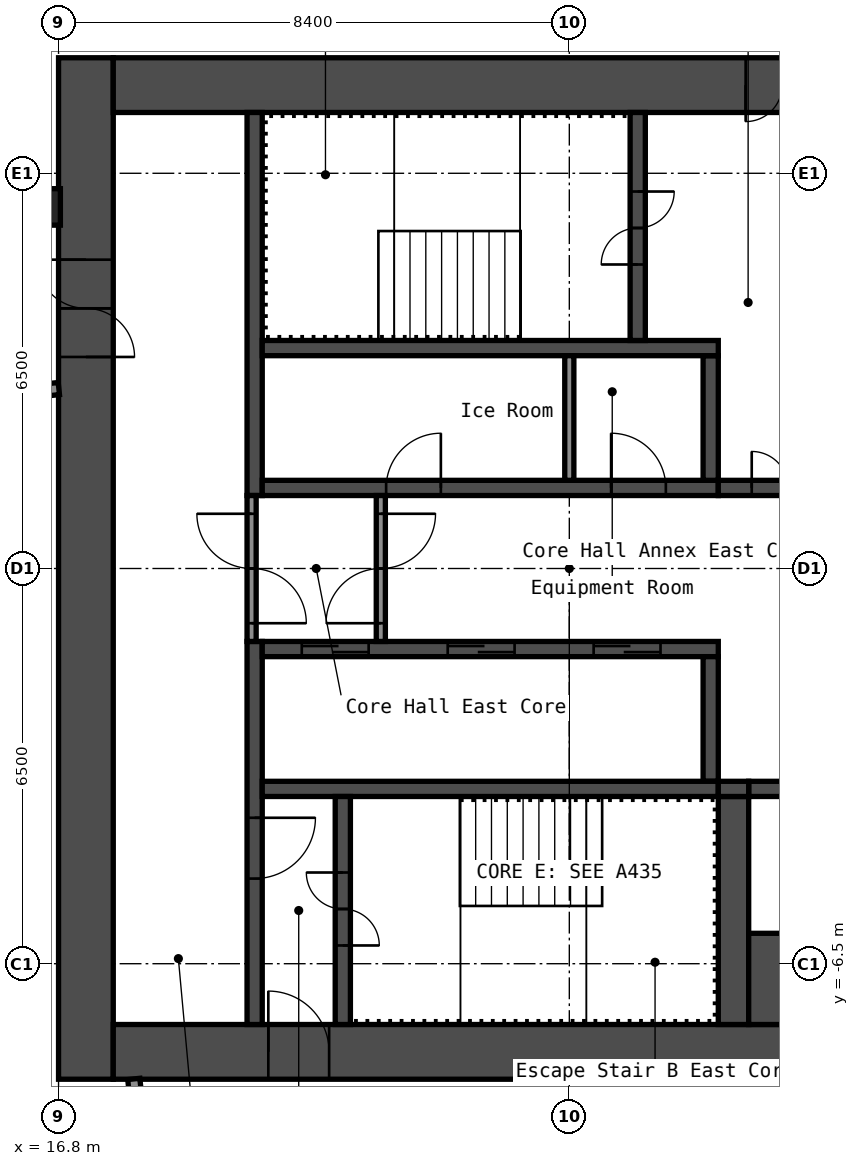
"""IFC4 building model, lengths in metres.
Left out: names, types, materials, properties, quantities, classifications, styles, units other than length and angle.
Written with IfcOpenShell. Run it as: python <this file> out.ifc"""

import sys

from ifc_helpers import new_model, si_unit, direction, frame, frame_2d, origin, origin_2d, place, context, subcontext, project, spatial, rectangle, hollow_rectangle, extrude, element, fill, save


model = new_model("IFC4")
c1 = context("Model", 3, precision=1e-05, world=origin(), true_north=direction((0.0, 1.0)))
c2 = subcontext(c1, "Body", "Model", "MODEL_VIEW")
j1 = project(units=[si_unit("LENGTHUNIT", "METRE"), si_unit("PLANEANGLEUNIT", "RADIAN")], contexts=[c1])
p1 = place(None, origin())
s1 = spatial("IfcSite", under=j1, at=p1, CompositionType="ELEMENT")
p2 = place(p1, origin())
s2 = spatial("IfcBuilding", under=s1, at=p2, CompositionType="ELEMENT")
p3 = place(p2, frame((0.0, 0.0, 239.0)))
s3 = spatial("IfcBuildingStorey", under=s2, at=p3, CompositionType="ELEMENT", Elevation=239.0)
p4 = place(p3, frame((16.53, 5.947, 0.0), z_axis=(0.0, 0.0, 1.0), x_axis=(1.0, 0.0, 0.0)))
e1 = element("IfcColumn", 1, at=p4, inside=s3, PredefinedType="COLUMN", context=c2, shape_type="SweptSolid", body=[
    extrude(hollow_rectangle(XDim=0.6, YDim=0.6, WallThickness=0.025, InnerFilletRadius=0.038, OuterFilletRadius=0.062, at=origin_2d()), origin(), (0.0, 0.0, 1.0), 2.75),
])
p5 = place(p3, frame((17.25, -8.4, 0.0), z_axis=(0.0, 0.0, 1.0), x_axis=(0.0, 1.0, 0.0)))
e2 = element("IfcWall", 2, at=p5, inside=s3, PredefinedType="SHEAR", context=c2, shape_type="SweptSolid", body=[
    extrude(rectangle(XDim=16.8, YDim=0.9, at=frame_2d((8.4, 0.0))), origin(), (0.0, 0.0, 1.0), 2.75),
])
p6 = place(p5, frame((11.879, 0.0, 0.0)))
e3 = element("IfcOpeningElement", 3, at=p6, cuts=e2, PredefinedType="OPENING", context=c2, shape_type="SweptSolid", body=[
    extrude(rectangle(XDim=1.6, YDim=2.1, at=frame_2d((0.8, 1.05))), frame((0.0, 0.46, 0.0), z_axis=(0.0, -1.0, 0.0), x_axis=(1.0, 0.0, 0.0)), (0.0, 0.0, 1.0), 0.92),
])
p7 = place(p3, frame((17.7, 7.95, 0.0), z_axis=(0.0, 0.0, 1.0), x_axis=(1.0, 0.0, 0.0)))
e4 = element("IfcWall", 4, at=p7, inside=s3, PredefinedType="SHEAR", context=c2, shape_type="SweptSolid", body=[
    extrude(rectangle(XDim=15.0, YDim=0.9, at=frame_2d((7.5, 0.0))), origin(), (0.0, 0.0, 1.0), 2.75),
])
p8 = place(p7, frame((10.4, 0.0, 0.0)))
e5 = element("IfcOpeningElement", 5, at=p8, cuts=e4, PredefinedType="OPENING", context=c2, shape_type="SweptSolid", body=[
    extrude(rectangle(XDim=1.2, YDim=2.1, at=frame_2d((0.6, 1.05))), frame((0.0, 0.46, 0.0), z_axis=(0.0, -1.0, 0.0), x_axis=(1.0, 0.0, 0.0)), (0.0, 0.0, 1.0), 0.92),
])
p9 = place(p7, frame((13.35, 0.0, 0.0)))
e6 = element("IfcOpeningElement", 6, at=p9, cuts=e4, PredefinedType="OPENING", context=c2, shape_type="SweptSolid", body=[
    extrude(rectangle(XDim=0.9, YDim=2.1, at=frame_2d((0.45, 1.05))), frame((0.0, 0.46, 0.0), z_axis=(0.0, -1.0, 0.0), x_axis=(1.0, 0.0, 0.0)), (0.0, 0.0, 1.0), 0.92),
])
p10 = place(p3, frame((17.7, -7.95, 0.0), z_axis=(0.0, 0.0, 1.0), x_axis=(1.0, 0.0, 0.0)))
e7 = element("IfcWall", 7, at=p10, inside=s3, PredefinedType="SHEAR", context=c2, shape_type="SweptSolid", body=[
    extrude(rectangle(XDim=15.0, YDim=0.9, at=frame_2d((7.5, 0.0))), origin(), (0.0, 0.0, 1.0), 2.75),
])
p11 = place(p10, frame((2.55, 0.0, 0.0)))
e8 = element("IfcOpeningElement", 8, at=p11, cuts=e7, PredefinedType="OPENING", context=c2, shape_type="SweptSolid", body=[
    extrude(rectangle(XDim=1.0, YDim=2.1, at=frame_2d((0.5, 1.05))), frame((0.0, 0.46, 0.0), z_axis=(0.0, -1.0, 0.0), x_axis=(1.0, 0.0, 0.0)), (0.0, 0.0, 1.0), 0.92),
])
p12 = place(p3, frame((20.025, 1.2, 0.0), z_axis=(0.0, 0.0, 1.0), x_axis=(0.0, 1.0, 0.0)))
e9 = element("IfcWall", 9, at=p12, inside=s3, PredefinedType="SHEAR", context=c2, shape_type="SweptSolid", body=[
    extrude(rectangle(XDim=6.3, YDim=0.25, at=frame_2d((3.15, 0.0))), origin(), (0.0, 0.0, 1.0), 2.75),
])
p13 = place(p3, frame((20.025, -7.5, 0.0), z_axis=(0.0, 0.0, 1.0), x_axis=(0.0, 1.0, 0.0)))
e10 = element("IfcWall", 10, at=p13, inside=s3, PredefinedType="SHEAR", context=c2, shape_type="SweptSolid", body=[
    extrude(rectangle(XDim=6.3, YDim=0.25, at=frame_2d((3.15, 0.0))), origin(), (0.0, 0.0, 1.0), 2.75),
])
p14 = place(p13, frame((2.4, 0.0, 0.0)))
e11 = element("IfcOpeningElement", 11, at=p14, cuts=e10, PredefinedType="OPENING", context=c2, shape_type="SweptSolid", body=[
    extrude(rectangle(XDim=1.0, YDim=2.1, at=frame_2d((0.5, 1.05))), frame((0.0, 0.135, 0.0), z_axis=(0.0, -1.0, 0.0), x_axis=(1.0, 0.0, 0.0)), (0.0, 0.0, 1.0), 0.27),
])
p15 = place(p3, frame((20.15, 1.325, 0.0), z_axis=(0.0, 0.0, 1.0), x_axis=(1.0, 0.0, 0.0)))
e12 = element("IfcWall", 12, at=p15, inside=s3, PredefinedType="SHEAR", context=c2, shape_type="SweptSolid", body=[
    extrude(rectangle(XDim=7.5, YDim=0.25, at=frame_2d((3.75, 0.0))), origin(), (0.0, 0.0, 1.0), 2.75),
])
p16 = place(p15, frame((2.038, 0.0, 0.0)))
e13 = element("IfcOpeningElement", 13, at=p16, cuts=e12, PredefinedType="OPENING", context=c2, shape_type="SweptSolid", body=[
    extrude(rectangle(XDim=0.9, YDim=2.1, at=frame_2d((0.45, 1.05))), frame((0.0, 0.135, 0.0), z_axis=(0.0, -1.0, 0.0), x_axis=(1.0, 0.0, 0.0)), (0.0, 0.0, 1.0), 0.27),
])
p17 = place(p15, frame((5.738, 0.0, 0.0)))
e14 = element("IfcOpeningElement", 14, at=p17, cuts=e12, PredefinedType="OPENING", context=c2, shape_type="SweptSolid", body=[
    extrude(rectangle(XDim=0.9, YDim=2.1, at=frame_2d((0.45, 1.05))), frame((0.0, 0.135, 0.0), z_axis=(0.0, -1.0, 0.0), x_axis=(1.0, 0.0, 0.0)), (0.0, 0.0, 1.0), 0.27),
])
p18 = place(p3, frame((27.525, 1.45, 0.0), z_axis=(0.0, 0.0, 1.0), x_axis=(0.0, 1.0, 0.0)))
e15 = element("IfcWall", 15, at=p18, inside=s3, PredefinedType="SHEAR", context=c2, shape_type="SweptSolid", body=[
    extrude(rectangle(XDim=2.05, YDim=0.25, at=frame_2d((1.025, 0.0))), origin(), (0.0, 0.0, 1.0), 2.75),
])
p19 = place(p3, frame((20.15, 3.625, 0.0), z_axis=(0.0, 0.0, 1.0), x_axis=(1.0, 0.0, 0.0)))
e16 = element("IfcWall", 16, at=p19, inside=s3, PredefinedType="SHEAR", context=c2, shape_type="SweptSolid", body=[
    extrude(rectangle(XDim=7.5, YDim=0.25, at=frame_2d((3.75, 0.0))), origin(), (0.0, 0.0, 1.0), 2.75),
])
p20 = place(p3, frame((26.325, 3.75, 0.0), z_axis=(0.0, 0.0, 1.0), x_axis=(0.0, 1.0, 0.0)))
e17 = element("IfcWall", 17, at=p20, inside=s3, PredefinedType="SHEAR", context=c2, shape_type="SweptSolid", body=[
    extrude(rectangle(XDim=3.75, YDim=0.25, at=frame_2d((1.875, 0.0))), origin(), (0.0, 0.0, 1.0), 2.75),
])
p21 = place(p20, frame((1.25, 0.0, 0.0)))
e18 = element("IfcOpeningElement", 18, at=p21, cuts=e17, PredefinedType="OPENING", context=c2, shape_type="SweptSolid", body=[
    extrude(rectangle(XDim=1.2, YDim=2.1, at=frame_2d((0.6, 1.05))), frame((0.0, 0.135, 0.0), z_axis=(0.0, -1.0, 0.0), x_axis=(1.0, 0.0, 0.0)), (0.0, 0.0, 1.0), 0.27),
])
p22 = place(p3, frame((27.65, 1.325, 0.0), z_axis=(0.0, 0.0, 1.0), x_axis=(1.0, 0.0, 0.0)))
e19 = element("IfcWall", 19, at=p22, inside=s3, PredefinedType="SHEAR", context=c2, shape_type="SweptSolid", body=[
    extrude(rectangle(XDim=5.05, YDim=0.25, at=frame_2d((2.525, 0.0))), origin(), (0.0, 0.0, 1.0), 2.75),
])
p23 = place(p22, frame((0.55, 0.0, 0.0)))
e20 = element("IfcOpeningElement", 20, at=p23, cuts=e19, PredefinedType="OPENING", context=c2, shape_type="SweptSolid", body=[
    extrude(rectangle(XDim=1.2, YDim=2.1, at=frame_2d((0.6, 1.05))), frame((0.0, 0.135, 0.0), z_axis=(0.0, -1.0, 0.0), x_axis=(1.0, 0.0, 0.0)), (0.0, 0.0, 1.0), 0.27),
])
p24 = place(p3, frame((20.15, -1.325, 0.0), z_axis=(0.0, 0.0, 1.0), x_axis=(1.0, 0.0, 0.0)))
e21 = element("IfcWall", 21, at=p24, inside=s3, PredefinedType="SHEAR", context=c2, shape_type="SweptSolid", body=[
    extrude(rectangle(XDim=7.5, YDim=0.25, at=frame_2d((3.75, 0.0))), origin(), (0.0, 0.0, 1.0), 2.75),
])
p25 = place(p24, frame((0.65, 0.0, 0.0)))
e22 = element("IfcOpeningElement", 22, at=p25, cuts=e21, PredefinedType="OPENING", context=c2, shape_type="SweptSolid", body=[
    extrude(rectangle(XDim=1.1, YDim=2.1, at=frame_2d((0.55, 1.05))), frame((0.0, 0.135, 0.0), z_axis=(0.0, -1.0, 0.0), x_axis=(1.0, 0.0, 0.0)), (0.0, 0.0, 1.0), 0.27),
])
p26 = place(p24, frame((3.05, 0.0, 0.0)))
e23 = element("IfcOpeningElement", 23, at=p26, cuts=e21, PredefinedType="OPENING", context=c2, shape_type="SweptSolid", body=[
    extrude(rectangle(XDim=1.1, YDim=2.1, at=frame_2d((0.55, 1.05))), frame((0.0, 0.135, 0.0), z_axis=(0.0, -1.0, 0.0), x_axis=(1.0, 0.0, 0.0)), (0.0, 0.0, 1.0), 0.27),
])
p27 = place(p24, frame((5.45, 0.0, 0.0)))
e24 = element("IfcOpeningElement", 24, at=p27, cuts=e21, PredefinedType="OPENING", context=c2, shape_type="SweptSolid", body=[
    extrude(rectangle(XDim=1.1, YDim=2.1, at=frame_2d((0.55, 1.05))), frame((0.0, 0.135, 0.0), z_axis=(0.0, -1.0, 0.0), x_axis=(1.0, 0.0, 0.0)), (0.0, 0.0, 1.0), 0.27),
])
p28 = place(p3, frame((27.525, -3.5, 0.0), z_axis=(0.0, 0.0, 1.0), x_axis=(0.0, 1.0, 0.0)))
e25 = element("IfcWall", 25, at=p28, inside=s3, PredefinedType="SHEAR", context=c2, shape_type="SweptSolid", body=[
    extrude(rectangle(XDim=2.05, YDim=0.25, at=frame_2d((1.025, 0.0))), origin(), (0.0, 0.0, 1.0), 2.75),
])
p29 = place(p3, frame((20.15, -3.625, 0.0), z_axis=(0.0, 0.0, 1.0), x_axis=(1.0, 0.0, 0.0)))
e26 = element("IfcWall", 26, at=p29, inside=s3, PredefinedType="SHEAR", context=c2, shape_type="SweptSolid", body=[
    extrude(rectangle(XDim=7.5, YDim=0.25, at=frame_2d((3.75, 0.0))), origin(), (0.0, 0.0, 1.0), 2.75),
])
p30 = place(p3, frame((21.475, -7.5, 0.0), z_axis=(0.0, 0.0, 1.0), x_axis=(0.0, 1.0, 0.0)))
e27 = element("IfcWall", 27, at=p30, inside=s3, PredefinedType="SHEAR", context=c2, shape_type="SweptSolid", body=[
    extrude(rectangle(XDim=3.75, YDim=0.25, at=frame_2d((1.875, 0.0))), origin(), (0.0, 0.0, 1.0), 2.75),
])
p31 = place(p30, frame((1.3, 0.0, 0.0)))
e28 = element("IfcOpeningElement", 28, at=p31, cuts=e27, PredefinedType="OPENING", context=c2, shape_type="SweptSolid", body=[
    extrude(rectangle(XDim=1.2, YDim=2.1, at=frame_2d((0.6, 1.05))), frame((0.0, 0.135, 0.0), z_axis=(0.0, -1.0, 0.0), x_axis=(1.0, 0.0, 0.0)), (0.0, 0.0, 1.0), 0.27),
])
p32 = place(p3, frame((27.9, -7.5, 0.0), z_axis=(0.0, 0.0, 1.0), x_axis=(0.0, 1.0, 0.0)))
e29 = element("IfcWall", 29, at=p32, inside=s3, PredefinedType="SHEAR", context=c2, shape_type="SweptSolid", body=[
    extrude(rectangle(XDim=3.75, YDim=0.5, at=frame_2d((1.875, 0.0))), origin(), (0.0, 0.0, 1.0), 2.75),
])
p33 = place(p3, frame((28.15, -3.625, 0.0), z_axis=(0.0, 0.0, 1.0), x_axis=(1.0, 0.0, 0.0)))
e30 = element("IfcWall", 30, at=p33, inside=s3, PredefinedType="SHEAR", context=c2, shape_type="SweptSolid", body=[
    extrude(rectangle(XDim=4.55, YDim=0.25, at=frame_2d((2.275, 0.0))), origin(), (0.0, 0.0, 1.0), 2.75),
])
p34 = place(p3, frame((28.15, -6.75, 0.0), z_axis=(0.0, 0.0, 1.0), x_axis=(1.0, 0.0, 0.0)))
e31 = element("IfcWall", 31, at=p34, inside=s3, PredefinedType="SHEAR", context=c2, shape_type="SweptSolid", body=[
    extrude(rectangle(XDim=4.55, YDim=1.5, at=frame_2d((2.275, 0.0))), origin(), (0.0, 0.0, 1.0), 2.75),
])
p35 = place(p3, frame((27.65, -3.625, 0.0), z_axis=(0.0, 0.0, 1.0), x_axis=(1.0, 0.0, 0.0)))
e32 = element("IfcWall", 32, at=p35, inside=s3, PredefinedType="SHEAR", context=c2, shape_type="SweptSolid", body=[
    extrude(rectangle(XDim=0.5, YDim=0.25, at=frame_2d((0.25, 0.0))), origin(), (0.0, 0.0, 1.0), 2.75),
])
p36 = place(p3, frame((19.975, -1.2, 0.0), z_axis=(0.0, 0.0, 1.0), x_axis=(0.0, 1.0, 0.0)))
e33 = element("IfcWall", 33, at=p36, inside=s3, PredefinedType="PARTITIONING", context=c2, shape_type="SweptSolid", body=[
    extrude(rectangle(XDim=2.4, YDim=0.15, at=frame_2d((1.2, 0.0))), origin(), (0.0, 0.0, 1.0), 2.75),
])
p37 = place(p36, frame((0.3, 0.0, 0.0)))
e34 = element("IfcOpeningElement", 34, at=p37, cuts=e33, PredefinedType="OPENING", context=c2, shape_type="SweptSolid", body=[
    extrude(rectangle(XDim=1.8, YDim=2.1, at=frame_2d((0.9, 1.05))), frame((0.0, 0.085, 0.0), z_axis=(0.0, -1.0, 0.0), x_axis=(1.0, 0.0, 0.0)), (0.0, 0.0, 1.0), 0.17),
])
p38 = place(p3, frame((22.1, -1.2, 0.0), z_axis=(0.0, 0.0, 1.0), x_axis=(0.0, 1.0, 0.0)))
e35 = element("IfcWall", 35, at=p38, inside=s3, PredefinedType="PARTITIONING", context=c2, shape_type="SweptSolid", body=[
    extrude(rectangle(XDim=2.4, YDim=0.15, at=frame_2d((1.2, 0.0))), origin(), (0.0, 0.0, 1.0), 2.75),
])
p39 = place(p38, frame((0.3, 0.0, 0.0)))
e36 = element("IfcOpeningElement", 36, at=p39, cuts=e35, PredefinedType="OPENING", context=c2, shape_type="SweptSolid", body=[
    extrude(rectangle(XDim=1.8, YDim=2.1, at=frame_2d((0.9, 1.05))), frame((0.0, 0.085, 0.0), z_axis=(0.0, -1.0, 0.0), x_axis=(1.0, 0.0, 0.0)), (0.0, 0.0, 1.0), 0.17),
])
p40 = place(p3, frame((25.2, 1.45, 0.0), z_axis=(0.0, 0.0, 1.0), x_axis=(0.0, 1.0, 0.0)))
e37 = element("IfcWall", 37, at=p40, inside=s3, PredefinedType="PARTITIONING", context=c2, shape_type="SweptSolid", body=[
    extrude(rectangle(XDim=2.05, YDim=0.15, at=frame_2d((1.025, 0.0))), origin(), (0.0, 0.0, 1.0), 2.75),
])
p41 = place(p3, frame((-16.572, -0.549, 0.0), z_axis=(0.0, 0.0, 1.0), x_axis=(0.994521146831, 0.104535584879, 0.0)))
e38 = element("IfcWall", 38, at=p41, inside=s3, PredefinedType="PARTITIONING", context=c2, shape_type="SweptSolid", body=[
    extrude(rectangle(XDim=33.561, YDim=0.2, at=frame_2d((16.78, 0.0))), origin(), (0.0, 0.0, 1.0), 2.75),
])
p42 = place(p41, frame((1.4, 0.0, 0.0)))
e39 = element("IfcOpeningElement", 39, at=p42, cuts=e38, PredefinedType="OPENING", context=c2, shape_type="SweptSolid", body=[
    extrude(rectangle(XDim=0.9, YDim=2.1, at=frame_2d((0.45, 1.05))), frame((0.0, 0.11, 0.0), z_axis=(0.0, -1.0, 0.0), x_axis=(1.0, 0.0, 0.0)), (0.0, 0.0, 1.0), 0.22),
])
p43 = place(p41, frame((5.6, 0.0, 0.0)))
e40 = element("IfcOpeningElement", 40, at=p43, cuts=e38, PredefinedType="OPENING", context=c2, shape_type="SweptSolid", body=[
    extrude(rectangle(XDim=0.9, YDim=2.1, at=frame_2d((0.45, 1.05))), frame((0.0, 0.11, 0.0), z_axis=(0.0, -1.0, 0.0), x_axis=(1.0, 0.0, 0.0)), (0.0, 0.0, 1.0), 0.22),
])
p44 = place(p41, frame((12.1, 0.0, 0.0)))
e41 = element("IfcOpeningElement", 41, at=p44, cuts=e38, PredefinedType="OPENING", context=c2, shape_type="SweptSolid", body=[
    extrude(rectangle(XDim=1.0, YDim=2.1, at=frame_2d((0.5, 1.05))), frame((0.0, 0.11, 0.0), z_axis=(0.0, -1.0, 0.0), x_axis=(1.0, 0.0, 0.0)), (0.0, 0.0, 1.0), 0.22),
])
p45 = place(p41, frame((18.8, 0.0, 0.0)))
e42 = element("IfcOpeningElement", 42, at=p45, cuts=e38, PredefinedType="OPENING", context=c2, shape_type="SweptSolid", body=[
    extrude(rectangle(XDim=1.0, YDim=2.1, at=frame_2d((0.5, 1.05))), frame((0.0, 0.11, 0.0), z_axis=(0.0, -1.0, 0.0), x_axis=(1.0, 0.0, 0.0)), (0.0, 0.0, 1.0), 0.22),
])
p46 = place(p41, frame((29.4, 0.0, 0.0)))
e43 = element("IfcOpeningElement", 43, at=p46, cuts=e38, PredefinedType="OPENING", context=c2, shape_type="SweptSolid", body=[
    extrude(rectangle(XDim=1.6, YDim=2.1, at=frame_2d((0.8, 1.05))), frame((0.0, 0.11, 0.0), z_axis=(0.0, -1.0, 0.0), x_axis=(1.0, 0.0, 0.0)), (0.0, 0.0, 1.0), 0.22),
])
p47 = place(p3, frame((18.516, -12.949, 0.0), z_axis=(0.0, 0.0, 1.0), x_axis=(-0.104548796268, 0.994519758074, 0.0)))
e44 = element("IfcWall", 44, at=p47, inside=s3, PredefinedType="PARTITIONING", context=c2, shape_type="SweptSolid", body=[
    extrude(rectangle(XDim=4.579, YDim=0.2, at=frame_2d((2.29, 0.0))), origin(), (0.0, 0.0, 1.0), 2.75),
])
p48 = place(p6, origin())
e45 = element("IfcDoor", 45, at=p48, inside=s3, OperationType="DOUBLE_DOOR_SINGLE_SWING", PredefinedType="DOOR", context=c2, shape_type="SweptSolid", body=[
    extrude(rectangle(XDim=1.6, YDim=2.1, at=frame_2d((0.8, 1.05))), frame((0.0, 0.025, 0.0), z_axis=(0.0, -1.0, 0.0), x_axis=(1.0, 0.0, 0.0)), (0.0, 0.0, 1.0), 0.05),
])
fill(e3, e45)
p49 = place(p8, origin())
e46 = element("IfcDoor", 46, at=p49, inside=s3, OperationType="DOUBLE_DOOR_SINGLE_SWING", PredefinedType="DOOR", context=c2, shape_type="SweptSolid", body=[
    extrude(rectangle(XDim=1.2, YDim=2.1, at=frame_2d((0.6, 1.05))), frame((0.0, 0.025, 0.0), z_axis=(0.0, -1.0, 0.0), x_axis=(1.0, 0.0, 0.0)), (0.0, 0.0, 1.0), 0.05),
])
fill(e5, e46)
p50 = place(p11, origin())
e47 = element("IfcDoor", 47, at=p50, inside=s3, OperationType="SINGLE_SWING_RIGHT", PredefinedType="DOOR", context=c2, shape_type="SweptSolid", body=[
    extrude(rectangle(XDim=1.0, YDim=2.1, at=frame_2d((0.5, 1.05))), frame((0.0, 0.025, 0.0), z_axis=(0.0, -1.0, 0.0), x_axis=(1.0, 0.0, 0.0)), (0.0, 0.0, 1.0), 0.05),
])
fill(e8, e47)
p51 = place(p21, origin())
e48 = element("IfcDoor", 48, at=p51, inside=s3, OperationType="DOUBLE_DOOR_SINGLE_SWING", PredefinedType="DOOR", context=c2, shape_type="SweptSolid", body=[
    extrude(rectangle(XDim=1.2, YDim=2.1, at=frame_2d((0.6, 1.05))), frame((0.0, 0.025, 0.0), z_axis=(0.0, -1.0, 0.0), x_axis=(1.0, 0.0, 0.0)), (0.0, 0.0, 1.0), 0.05),
])
fill(e18, e48)
p52 = place(p31, origin())
e49 = element("IfcDoor", 49, at=p52, inside=s3, OperationType="DOUBLE_DOOR_SINGLE_SWING", PredefinedType="DOOR", context=c2, shape_type="SweptSolid", body=[
    extrude(rectangle(XDim=1.2, YDim=2.1, at=frame_2d((0.6, 1.05))), frame((0.0, 0.025, 0.0), z_axis=(0.0, -1.0, 0.0), x_axis=(1.0, 0.0, 0.0)), (0.0, 0.0, 1.0), 0.05),
])
fill(e28, e49)
p53 = place(p14, origin())
e50 = element("IfcDoor", 50, at=p53, inside=s3, OperationType="SINGLE_SWING_RIGHT", PredefinedType="DOOR", context=c2, shape_type="SweptSolid", body=[
    extrude(rectangle(XDim=1.0, YDim=2.1, at=frame_2d((0.5, 1.05))), frame((0.0, 0.025, 0.0), z_axis=(0.0, -1.0, 0.0), x_axis=(1.0, 0.0, 0.0)), (0.0, 0.0, 1.0), 0.05),
])
fill(e11, e50)
p54 = place(p23, origin())
e51 = element("IfcDoor", 51, at=p54, inside=s3, OperationType="DOUBLE_DOOR_SINGLE_SWING", PredefinedType="DOOR", context=c2, shape_type="SweptSolid", body=[
    extrude(rectangle(XDim=1.2, YDim=2.1, at=frame_2d((0.6, 1.05))), frame((0.0, 0.025, 0.0), z_axis=(0.0, -1.0, 0.0), x_axis=(1.0, 0.0, 0.0)), (0.0, 0.0, 1.0), 0.05),
])
fill(e20, e51)
p55 = place(p37, origin())
e52 = element("IfcDoor", 52, at=p55, inside=s3, OperationType="DOUBLE_DOOR_SINGLE_SWING", PredefinedType="DOOR", context=c2, shape_type="SweptSolid", body=[
    extrude(rectangle(XDim=1.8, YDim=2.1, at=frame_2d((0.9, 1.05))), frame((0.0, 0.025, 0.0), z_axis=(0.0, -1.0, 0.0), x_axis=(1.0, 0.0, 0.0)), (0.0, 0.0, 1.0), 0.05),
])
fill(e34, e52)
p56 = place(p39, origin())
e53 = element("IfcDoor", 53, at=p56, inside=s3, OperationType="DOUBLE_DOOR_SINGLE_SWING", PredefinedType="DOOR", context=c2, shape_type="SweptSolid", body=[
    extrude(rectangle(XDim=1.8, YDim=2.1, at=frame_2d((0.9, 1.05))), frame((0.0, 0.025, 0.0), z_axis=(0.0, -1.0, 0.0), x_axis=(1.0, 0.0, 0.0)), (0.0, 0.0, 1.0), 0.05),
])
fill(e36, e53)
p57 = place(p16, origin())
e54 = element("IfcDoor", 54, at=p57, inside=s3, OperationType="SINGLE_SWING_LEFT", PredefinedType="DOOR", context=c2, shape_type="SweptSolid", body=[
    extrude(rectangle(XDim=0.9, YDim=2.1, at=frame_2d((0.45, 1.05))), frame((0.0, 0.025, 0.0), z_axis=(0.0, -1.0, 0.0), x_axis=(1.0, 0.0, 0.0)), (0.0, 0.0, 1.0), 0.05),
])
fill(e13, e54)
p58 = place(p17, origin())
e55 = element("IfcDoor", 55, at=p58, inside=s3, OperationType="SINGLE_SWING_RIGHT", PredefinedType="DOOR", context=c2, shape_type="SweptSolid", body=[
    extrude(rectangle(XDim=0.9, YDim=2.1, at=frame_2d((0.45, 1.05))), frame((0.0, 0.025, 0.0), z_axis=(0.0, -1.0, 0.0), x_axis=(1.0, 0.0, 0.0)), (0.0, 0.0, 1.0), 0.05),
])
fill(e14, e55)
p59 = place(p25, origin())
e56 = element("IfcDoor", 56, at=p59, inside=s3, OperationType="DOUBLE_DOOR_SLIDING", PredefinedType="DOOR", context=c2, shape_type="SweptSolid", body=[
    extrude(rectangle(XDim=1.1, YDim=2.1, at=frame_2d((0.55, 1.05))), frame((0.0, 0.025, 0.0), z_axis=(0.0, -1.0, 0.0), x_axis=(1.0, 0.0, 0.0)), (0.0, 0.0, 1.0), 0.05),
])
fill(e22, e56)
p60 = place(p26, origin())
e57 = element("IfcDoor", 57, at=p60, inside=s3, OperationType="DOUBLE_DOOR_SLIDING", PredefinedType="DOOR", context=c2, shape_type="SweptSolid", body=[
    extrude(rectangle(XDim=1.1, YDim=2.1, at=frame_2d((0.55, 1.05))), frame((0.0, 0.025, 0.0), z_axis=(0.0, -1.0, 0.0), x_axis=(1.0, 0.0, 0.0)), (0.0, 0.0, 1.0), 0.05),
])
fill(e23, e57)
p61 = place(p27, origin())
e58 = element("IfcDoor", 58, at=p61, inside=s3, OperationType="DOUBLE_DOOR_SLIDING", PredefinedType="DOOR", context=c2, shape_type="SweptSolid", body=[
    extrude(rectangle(XDim=1.1, YDim=2.1, at=frame_2d((0.55, 1.05))), frame((0.0, 0.025, 0.0), z_axis=(0.0, -1.0, 0.0), x_axis=(1.0, 0.0, 0.0)), (0.0, 0.0, 1.0), 0.05),
])
fill(e24, e58)
save(model, sys.argv[1])
